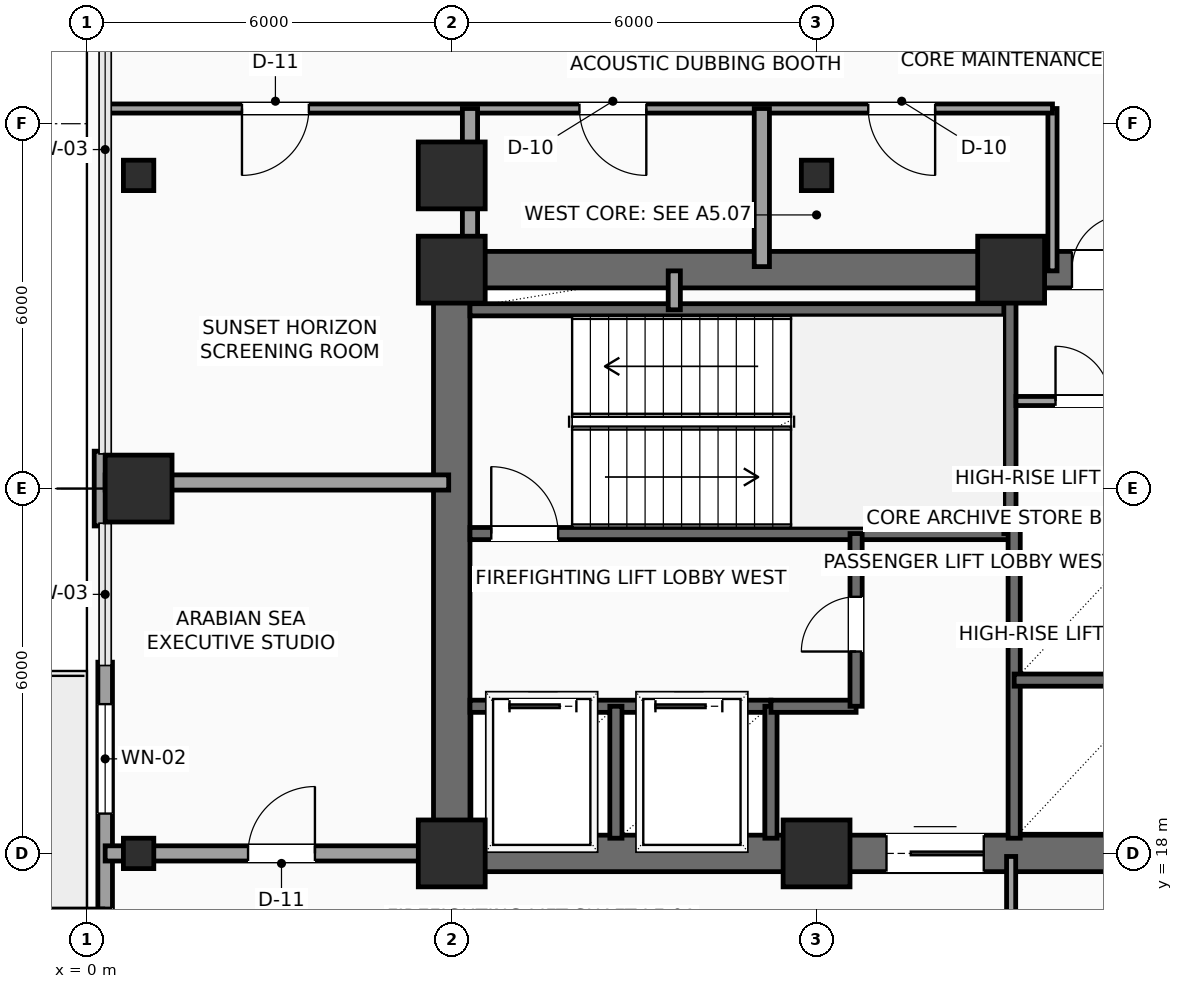
"""IFC4 building model, lengths in metres.
Left out: names, types, materials, properties, quantities, classifications, styles, units other than length and angle.
Written with IfcOpenShell. Run it as: python <this file> out.ifc"""

import sys

from ifc_helpers import new_model, si_unit, direction, frame, frame_2d, origin, origin_2d, place, context, subcontext, project, spatial, rectangle, hollow_rectangle, extrude, element, fill, save


model = new_model("IFC4")
c1 = context("Model", 3, precision=1e-05, world=origin(), true_north=direction((0.0, 1.0)))
c2 = subcontext(c1, "Body", "Model", "MODEL_VIEW")
j1 = project(units=[si_unit("LENGTHUNIT", "METRE"), si_unit("PLANEANGLEUNIT", "RADIAN")], contexts=[c1])
p1 = place(None, origin())
s1 = spatial("IfcSite", under=j1, at=p1, CompositionType="ELEMENT")
p2 = place(p1, origin())
s2 = spatial("IfcBuilding", under=s1, at=p2, CompositionType="ELEMENT")
p3 = place(p2, frame((0.0, 0.0, 130.65)))
s3 = spatial("IfcBuildingStorey", under=s2, at=p3, CompositionType="ELEMENT", Elevation=130.65)
for number, where, z_axis, x_axis in (
    (1, (6.0, 18.0, 0.0), (0.0, 0.0, 1.0), (1.0, 0.0, 0.0)),
    (2, (12.0, 18.0, 0.0), (0.0, 0.0, 1.0), (1.0, 0.0, 0.0)),
    (3, (6.0, 27.6, 0.0), (0.0, 0.0, 1.0), (1.0, 0.0, 0.0)),
    (4, (15.2, 27.6, 0.0), (0.0, 0.0, 1.0), (1.0, 0.0, 0.0)),
):
    element("IfcColumn", number, at=place(p3, frame(where, z_axis=z_axis, x_axis=x_axis)), inside=s3, PredefinedType="COLUMN", context=c2, shape_type="SweptSolid", body=[
        extrude(rectangle(XDim=1.1, YDim=1.1, at=origin_2d()), origin(), (0.0, 0.0, 1.0), 3.75),
    ])
p4 = place(p3, frame((0.85, 18.0, 0.0), z_axis=(0.0, 0.0, 1.0), x_axis=(1.0, 0.0, 0.0)))
e5 = element("IfcColumn", 5, at=p4, inside=s3, PredefinedType="COLUMN", context=c2, shape_type="SweptSolid", body=[
    extrude(hollow_rectangle(XDim=0.5, YDim=0.5, WallThickness=0.025, InnerFilletRadius=0.025, OuterFilletRadius=0.04, at=origin_2d()), origin(), (0.0, 0.0, 1.0), 3.75),
])
p5 = place(p3, frame((0.85, 24.0, 0.0), z_axis=(0.0, 0.0, 1.0), x_axis=(1.0, 0.0, 0.0)))
e6 = element("IfcColumn", 6, at=p5, inside=s3, PredefinedType="COLUMN", context=c2, shape_type="SweptSolid", body=[
    extrude(rectangle(XDim=1.1, YDim=1.1, at=origin_2d()), origin(), (0.0, 0.0, 1.0), 3.75),
])
p6 = place(p3, frame((0.85, 29.15, 0.0), z_axis=(0.0, 0.0, 1.0), x_axis=(1.0, 0.0, 0.0)))
e7 = element("IfcColumn", 7, at=p6, inside=s3, PredefinedType="COLUMN", context=c2, shape_type="SweptSolid", body=[
    extrude(hollow_rectangle(XDim=0.5, YDim=0.5, WallThickness=0.025, InnerFilletRadius=0.025, OuterFilletRadius=0.04, at=origin_2d()), origin(), (0.0, 0.0, 1.0), 3.75),
])
p7 = place(p3, frame((6.0, 29.15, 0.0), z_axis=(0.0, 0.0, 1.0), x_axis=(1.0, 0.0, 0.0)))
e8 = element("IfcColumn", 8, at=p7, inside=s3, PredefinedType="COLUMN", context=c2, shape_type="SweptSolid", body=[
    extrude(rectangle(XDim=1.1, YDim=1.1, at=origin_2d()), origin(), (0.0, 0.0, 1.0), 3.75),
])
p8 = place(p3, frame((12.0, 29.15, 0.0), z_axis=(0.0, 0.0, 1.0), x_axis=(1.0, 0.0, 0.0)))
e9 = element("IfcColumn", 9, at=p8, inside=s3, PredefinedType="COLUMN", context=c2, shape_type="SweptSolid", body=[
    extrude(hollow_rectangle(XDim=0.5, YDim=0.5, WallThickness=0.025, InnerFilletRadius=0.025, OuterFilletRadius=0.04, at=origin_2d()), origin(), (0.0, 0.0, 1.0), 3.75),
])
p9 = place(p3, frame((0.3, 11.855, 0.0), z_axis=(0.0, 0.0, 1.0), x_axis=(0.0, 1.0, 0.0)))
e10 = element("IfcWall", 10, at=p9, inside=s3, PredefinedType="SOLIDWALL", context=c2, shape_type="SweptSolid", body=[
    extrude(rectangle(XDim=9.29, YDim=0.24, at=frame_2d((4.645, 0.0))), origin(), (0.0, 0.0, 1.0), 3.525),
])
p10 = place(p9, frame((4.2, 0.0, 0.0)))
e11 = element("IfcOpeningElement", 11, at=p10, cuts=e10, PredefinedType="OPENING", context=c2, shape_type="SweptSolid", body=[
    extrude(rectangle(XDim=1.05, YDim=2.2, at=frame_2d((0.525, 1.1))), frame((0.0, 0.13, 0.0), z_axis=(0.0, -1.0, 0.0), x_axis=(1.0, 0.0, 0.0)), (0.0, 0.0, 1.0), 0.26),
])
p11 = place(p9, frame((6.8, 0.0, 0.85)))
e12 = element("IfcOpeningElement", 12, at=p11, cuts=e10, PredefinedType="OPENING", context=c2, shape_type="SweptSolid", body=[
    extrude(rectangle(XDim=1.8, YDim=2.1, at=frame_2d((0.9, 1.05))), frame((0.0, 0.13, 0.0), z_axis=(0.0, -1.0, 0.0), x_axis=(1.0, 0.0, 0.0)), (0.0, 0.0, 1.0), 0.26),
])
p12 = place(p3, frame((0.24, 23.385, 0.0), z_axis=(0.0, 0.0, 1.0), x_axis=(0.0, 1.0, 0.0)))
e13 = element("IfcWall", 13, at=p12, inside=s3, PredefinedType="SOLIDWALL", context=c2, shape_type="SweptSolid", body=[
    extrude(rectangle(XDim=1.23, YDim=0.24, at=frame_2d((0.615, 0.0))), origin(), (0.0, 0.0, 1.0), 3.525),
])
p13 = place(p3, frame((6.0, 18.0, 0.0), z_axis=(0.0, 0.0, 1.0), x_axis=(1.0, 0.0, 0.0)))
e14 = element("IfcWall", 14, at=p13, inside=s3, PredefinedType="SHEAR", context=c2, shape_type="SweptSolid", body=[
    extrude(rectangle(XDim=12.0, YDim=0.6, at=frame_2d((6.0, 0.0))), origin(), (0.0, 0.0, 1.0), 3.525),
])
p14 = place(p13, frame((7.15, 0.0, 0.0)))
e15 = element("IfcOpeningElement", 15, at=p14, cuts=e14, PredefinedType="OPENING", context=c2, shape_type="SweptSolid", body=[
    extrude(rectangle(XDim=1.6, YDim=2.3, at=frame_2d((0.8, 1.15))), frame((0.0, 0.31, 0.0), z_axis=(0.0, -1.0, 0.0), x_axis=(1.0, 0.0, 0.0)), (0.0, 0.0, 1.0), 0.62),
])
p15 = place(p3, frame((6.0, 27.6, 0.0), z_axis=(0.0, 0.0, 1.0), x_axis=(1.0, 0.0, 0.0)))
e16 = element("IfcWall", 16, at=p15, inside=s3, PredefinedType="SHEAR", context=c2, shape_type="SweptSolid", body=[
    extrude(rectangle(XDim=12.0, YDim=0.6, at=frame_2d((6.0, 0.0))), origin(), (0.0, 0.0, 1.0), 3.525),
])
p16 = place(p15, frame((10.2, 0.0, 0.0)))
e17 = element("IfcOpeningElement", 17, at=p16, cuts=e16, PredefinedType="OPENING", context=c2, shape_type="SweptSolid", body=[
    extrude(rectangle(XDim=0.9, YDim=2.15, at=frame_2d((0.45, 1.075))), frame((0.0, 0.31, 0.0), z_axis=(0.0, -1.0, 0.0), x_axis=(1.0, 0.0, 0.0)), (0.0, 0.0, 1.0), 0.62),
])
p17 = place(p3, frame((6.0, 18.0, 0.0), z_axis=(0.0, 0.0, 1.0), x_axis=(0.0, 1.0, 0.0)))
e18 = element("IfcWall", 18, at=p17, inside=s3, PredefinedType="SHEAR", context=c2, shape_type="SweptSolid", body=[
    extrude(rectangle(XDim=9.6, YDim=0.6, at=frame_2d((4.8, 0.0))), origin(), (0.0, 0.0, 1.0), 3.525),
])
p18 = place(p3, frame((6.3, 23.26, 0.0), z_axis=(0.0, 0.0, 1.0), x_axis=(1.0, 0.0, 0.0)))
e19 = element("IfcWall", 19, at=p18, inside=s3, PredefinedType="SHEAR", context=c2, shape_type="SweptSolid", body=[
    extrude(rectangle(XDim=8.88, YDim=0.2, at=frame_2d((4.44, 0.0))), origin(), (0.0, 0.0, 1.0), 3.525),
])
p19 = place(p18, frame((0.35, 0.0, 0.0)))
e20 = element("IfcOpeningElement", 20, at=p19, cuts=e19, PredefinedType="OPENING", context=c2, shape_type="SweptSolid", body=[
    extrude(rectangle(XDim=1.1, YDim=2.2, at=frame_2d((0.55, 1.1))), frame((0.0, 0.11, 0.0), z_axis=(0.0, -1.0, 0.0), x_axis=(1.0, 0.0, 0.0)), (0.0, 0.0, 1.0), 0.22),
])
p20 = place(p3, frame((6.3, 26.94, 0.0), z_axis=(0.0, 0.0, 1.0), x_axis=(1.0, 0.0, 0.0)))
e21 = element("IfcWall", 21, at=p20, inside=s3, PredefinedType="SHEAR", context=c2, shape_type="SweptSolid", body=[
    extrude(rectangle(XDim=8.88, YDim=0.2, at=frame_2d((4.44, 0.0))), origin(), (0.0, 0.0, 1.0), 3.525),
])
p21 = place(p3, frame((15.18, 23.26, 0.0), z_axis=(0.0, 0.0, 1.0), x_axis=(0.0, 1.0, 0.0)))
e22 = element("IfcWall", 22, at=p21, inside=s3, PredefinedType="SHEAR", context=c2, shape_type="SweptSolid", body=[
    extrude(rectangle(XDim=4.04, YDim=0.2, at=frame_2d((2.02, 0.0))), origin(), (0.0, 0.0, 1.0), 3.525),
])
p22 = place(p3, frame((6.3, 20.42, 0.0), z_axis=(0.0, 0.0, 1.0), x_axis=(1.0, 0.0, 0.0)))
e23 = element("IfcWall", 23, at=p22, inside=s3, PredefinedType="SHEAR", context=c2, shape_type="SweptSolid", body=[
    extrude(rectangle(XDim=4.95, YDim=0.2, at=frame_2d((2.475, 0.0))), origin(), (0.0, 0.0, 1.0), 3.525),
])
p23 = place(p22, frame((0.65, 0.0, 0.0)))
e24 = element("IfcOpeningElement", 24, at=p23, cuts=e23, PredefinedType="OPENING", context=c2, shape_type="SweptSolid", body=[
    extrude(rectangle(XDim=1.1, YDim=2.2, at=frame_2d((0.55, 1.1))), frame((0.0, 0.11, 0.0), z_axis=(0.0, -1.0, 0.0), x_axis=(1.0, 0.0, 0.0)), (0.0, 0.0, 1.0), 0.22),
])
p24 = place(p22, frame((3.05, 0.0, 0.0)))
e25 = element("IfcOpeningElement", 25, at=p24, cuts=e23, PredefinedType="OPENING", context=c2, shape_type="SweptSolid", body=[
    extrude(rectangle(XDim=1.1, YDim=2.2, at=frame_2d((0.55, 1.1))), frame((0.0, 0.11, 0.0), z_axis=(0.0, -1.0, 0.0), x_axis=(1.0, 0.0, 0.0)), (0.0, 0.0, 1.0), 0.22),
])
for number, where, z_axis, x_axis in (
    (26, (8.7, 18.25, 0.0), (0.0, 0.0, 1.0), (0.0, 1.0, 0.0)),
    (27, (11.25, 18.25, 0.0), (0.0, 0.0, 1.0), (0.0, 1.0, 0.0)),
):
    element("IfcWall", number, at=place(p3, frame(where, z_axis=z_axis, x_axis=x_axis)), inside=s3, PredefinedType="SHEAR", context=c2, shape_type="SweptSolid", body=[
        extrude(rectangle(XDim=2.17, YDim=0.2, at=frame_2d((1.085, 0.0))), origin(), (0.0, 0.0, 1.0), 3.525),
    ])
p25 = place(p3, frame((11.25, 20.42, 0.0), z_axis=(0.0, 0.0, 1.0), x_axis=(1.0, 0.0, 0.0)))
e28 = element("IfcWall", 28, at=p25, inside=s3, PredefinedType="SHEAR", context=c2, shape_type="SweptSolid", body=[
    extrude(rectangle(XDim=1.4, YDim=0.2, at=frame_2d((0.7, 0.0))), origin(), (0.0, 0.0, 1.0), 3.525),
])
p26 = place(p3, frame((12.65, 20.42, 0.0), z_axis=(0.0, 0.0, 1.0), x_axis=(0.0, 1.0, 0.0)))
e29 = element("IfcWall", 29, at=p26, inside=s3, PredefinedType="SHEAR", context=c2, shape_type="SweptSolid", body=[
    extrude(rectangle(XDim=2.84, YDim=0.2, at=frame_2d((1.42, 0.0))), origin(), (0.0, 0.0, 1.0), 3.525),
])
p27 = place(p26, frame((0.9, 0.0, 0.0)))
e30 = element("IfcOpeningElement", 30, at=p27, cuts=e29, PredefinedType="OPENING", context=c2, shape_type="SweptSolid", body=[
    extrude(rectangle(XDim=0.9, YDim=2.15, at=frame_2d((0.45, 1.075))), frame((0.0, 0.11, 0.0), z_axis=(0.0, -1.0, 0.0), x_axis=(1.0, 0.0, 0.0)), (0.0, 0.0, 1.0), 0.22),
])
p28 = place(p3, frame((9.66, 26.94, 0.0), z_axis=(0.0, 0.0, 1.0), x_axis=(0.0, 1.0, 0.0)))
e31 = element("IfcWall", 31, at=p28, inside=s3, PredefinedType="SOLIDWALL", context=c2, shape_type="SweptSolid", body=[
    extrude(rectangle(XDim=0.64, YDim=0.2, at=frame_2d((0.32, 0.0))), origin(), (0.0, 0.0, 1.0), 3.525),
])
p29 = place(p3, frame((15.25, 18.25, 0.0), z_axis=(0.0, 0.0, 1.0), x_axis=(0.0, 1.0, 0.0)))
e32 = element("IfcWall", 32, at=p29, inside=s3, PredefinedType="SHEAR", context=c2, shape_type="SweptSolid", body=[
    extrude(rectangle(XDim=5.2, YDim=0.2, at=frame_2d((2.6, 0.0))), origin(), (0.0, 0.0, 1.0), 3.525),
])
p30 = place(p3, frame((15.25, 20.85, 0.0), z_axis=(0.0, 0.0, 1.0), x_axis=(1.0, 0.0, 0.0)))
e33 = element("IfcWall", 33, at=p30, inside=s3, PredefinedType="SHEAR", context=c2, shape_type="SweptSolid", body=[
    extrude(rectangle(XDim=2.4, YDim=0.2, at=frame_2d((1.2, 0.0))), origin(), (0.0, 0.0, 1.0), 3.525),
])
p31 = place(p3, frame((15.25, 23.45, 0.0), z_axis=(0.0, 0.0, 1.0), x_axis=(1.0, 0.0, 0.0)))
e34 = element("IfcWall", 34, at=p31, inside=s3, PredefinedType="SHEAR", context=c2, shape_type="SweptSolid", body=[
    extrude(rectangle(XDim=2.45, YDim=0.2, at=frame_2d((1.225, 0.0))), origin(), (0.0, 0.0, 1.0), 3.525),
])
p32 = place(p3, frame((15.28, 25.44, 0.0), z_axis=(0.0, 0.0, 1.0), x_axis=(1.0, 0.0, 0.0)))
e35 = element("IfcWall", 35, at=p32, inside=s3, PredefinedType="PARTITIONING", context=c2, shape_type="SweptSolid", body=[
    extrude(rectangle(XDim=2.42, YDim=0.15, at=frame_2d((1.21, 0.0))), origin(), (0.0, 0.0, 1.0), 3.525),
])
p33 = place(p32, frame((0.65, 0.0, 0.0)))
e36 = element("IfcOpeningElement", 36, at=p33, cuts=e35, PredefinedType="OPENING", context=c2, shape_type="SweptSolid", body=[
    extrude(rectangle(XDim=0.9, YDim=2.15, at=frame_2d((0.45, 1.075))), frame((0.0, 0.085, 0.0), z_axis=(0.0, -1.0, 0.0), x_axis=(1.0, 0.0, 0.0)), (0.0, 0.0, 1.0), 0.17),
])
p34 = place(p3, frame((15.2, 17.95, 0.0), z_axis=(0.0, 0.0, 1.0), x_axis=(0.0, -1.0, 0.0)))
e37 = element("IfcWall", 37, at=p34, inside=s3, PredefinedType="PARTITIONING", context=c2, shape_type="SweptSolid", body=[
    extrude(rectangle(XDim=2.4, YDim=0.15, at=frame_2d((1.2, 0.0))), origin(), (0.0, 0.0, 1.0), 3.525),
])
p35 = place(p3, frame((15.88, 27.58, 0.0), z_axis=(0.0, 0.0, 1.0), x_axis=(0.0, 1.0, 0.0)))
e38 = element("IfcWall", 38, at=p35, inside=s3, PredefinedType="PARTITIONING", context=c2, shape_type="SweptSolid", body=[
    extrude(rectangle(XDim=2.67, YDim=0.15, at=frame_2d((1.335, 0.0))), origin(), (0.0, 0.0, 1.0), 3.525),
])
p36 = place(p3, frame((15.88, 30.25, 0.0), z_axis=(0.0, 0.0, 1.0), x_axis=(-1.0, 0.0, 0.0)))
e39 = element("IfcWall", 39, at=p36, inside=s3, PredefinedType="PARTITIONING", context=c2, shape_type="SweptSolid", body=[
    extrude(rectangle(XDim=15.58, YDim=0.15, at=frame_2d((7.79, 0.0))), origin(), (0.0, 0.0, 1.0), 3.525),
])
p37 = place(p36, frame((12.23, 0.0, 0.0)))
e40 = element("IfcOpeningElement", 40, at=p37, cuts=e39, PredefinedType="OPENING", context=c2, shape_type="SweptSolid", body=[
    extrude(rectangle(XDim=1.1, YDim=2.25, at=frame_2d((0.55, 1.125))), frame((0.0, 0.085, 0.0), z_axis=(0.0, -1.0, 0.0), x_axis=(1.0, 0.0, 0.0)), (0.0, 0.0, 1.0), 0.17),
])
p38 = place(p36, frame((6.68, 0.0, 0.0)))
e41 = element("IfcOpeningElement", 41, at=p38, cuts=e39, PredefinedType="OPENING", context=c2, shape_type="SweptSolid", body=[
    extrude(rectangle(XDim=1.1, YDim=2.25, at=frame_2d((0.55, 1.125))), frame((0.0, 0.085, 0.0), z_axis=(0.0, -1.0, 0.0), x_axis=(1.0, 0.0, 0.0)), (0.0, 0.0, 1.0), 0.17),
])
p39 = place(p36, frame((1.93, 0.0, 0.0)))
e42 = element("IfcOpeningElement", 42, at=p39, cuts=e39, PredefinedType="OPENING", context=c2, shape_type="SweptSolid", body=[
    extrude(rectangle(XDim=1.1, YDim=2.25, at=frame_2d((0.55, 1.125))), frame((0.0, 0.085, 0.0), z_axis=(0.0, -1.0, 0.0), x_axis=(1.0, 0.0, 0.0)), (0.0, 0.0, 1.0), 0.17),
])
p40 = place(p3, frame((0.3, 18.0, 0.0), z_axis=(0.0, 0.0, 1.0), x_axis=(1.0, 0.0, 0.0)))
e43 = element("IfcWall", 43, at=p40, inside=s3, PredefinedType="PARTITIONING", context=c2, shape_type="SweptSolid", body=[
    extrude(rectangle(XDim=5.65, YDim=0.25, at=frame_2d((2.825, 0.0))), origin(), (0.0, 0.0, 1.0), 3.017),
])
p41 = place(p40, frame((2.35, 0.0, 0.0)))
e44 = element("IfcOpeningElement", 44, at=p41, cuts=e43, PredefinedType="OPENING", context=c2, shape_type="SweptSolid", body=[
    extrude(rectangle(XDim=1.1, YDim=2.25, at=frame_2d((0.55, 1.125))), frame((0.0, 0.135, 0.0), z_axis=(0.0, -1.0, 0.0), x_axis=(1.0, 0.0, 0.0)), (0.0, 0.0, 1.0), 0.27),
])
p42 = place(p3, frame((0.3, 24.1, 0.0), z_axis=(0.0, 0.0, 1.0), x_axis=(1.0, 0.0, 0.0)))
e45 = element("IfcWall", 45, at=p42, inside=s3, PredefinedType="PARTITIONING", context=c2, shape_type="SweptSolid", body=[
    extrude(rectangle(XDim=5.65, YDim=0.25, at=frame_2d((2.825, 0.0))), origin(), (0.0, 0.0, 1.0), 3.525),
])
p43 = place(p3, frame((6.3, 27.65, 0.0), z_axis=(0.0, 0.0, 1.0), x_axis=(0.0, 1.0, 0.0)))
e46 = element("IfcWall", 46, at=p43, inside=s3, PredefinedType="PARTITIONING", context=c2, shape_type="SweptSolid", body=[
    extrude(rectangle(XDim=2.6, YDim=0.25, at=frame_2d((1.3, 0.0))), origin(), (0.0, 0.0, 1.0), 3.017),
])
p44 = place(p3, frame((11.1, 27.65, 0.0), z_axis=(0.0, 0.0, 1.0), x_axis=(0.0, 1.0, 0.0)))
e47 = element("IfcWall", 47, at=p44, inside=s3, PredefinedType="PARTITIONING", context=c2, shape_type="SweptSolid", body=[
    extrude(rectangle(XDim=2.6, YDim=0.25, at=frame_2d((1.3, 0.0))), origin(), (0.0, 0.0, 1.0), 3.525),
])
p45 = place(p10, origin())
e48 = element("IfcDoor", 48, at=p45, inside=s3, OperationType="SINGLE_SWING_RIGHT", PredefinedType="DOOR", context=c2, shape_type="SweptSolid", body=[
    extrude(rectangle(XDim=1.05, YDim=2.2, at=frame_2d((0.525, 1.1))), frame((0.0, 0.025, 0.0), z_axis=(0.0, -1.0, 0.0), x_axis=(1.0, 0.0, 0.0)), (0.0, 0.0, 1.0), 0.05),
])
fill(e11, e48)
p46 = place(p11, origin())
e49 = element("IfcWindow", 49, at=p46, inside=s3, PartitioningType="SINGLE_PANEL", PredefinedType="WINDOW", context=c2, shape_type="SweptSolid", body=[
    extrude(rectangle(XDim=1.8, YDim=2.1, at=frame_2d((0.9, 1.05))), frame((0.0, 0.03, 0.0), z_axis=(0.0, -1.0, 0.0), x_axis=(1.0, 0.0, 0.0)), (0.0, 0.0, 1.0), 0.06),
])
fill(e12, e49)
p47 = place(p14, origin())
e50 = element("IfcDoor", 50, at=p47, inside=s3, OperationType="DOUBLE_DOOR_SLIDING", PredefinedType="DOOR", context=c2, shape_type="SweptSolid", body=[
    extrude(rectangle(XDim=1.6, YDim=2.3, at=frame_2d((0.8, 1.15))), frame((0.0, 0.025, 0.0), z_axis=(0.0, -1.0, 0.0), x_axis=(1.0, 0.0, 0.0)), (0.0, 0.0, 1.0), 0.05),
])
fill(e15, e50)
p48 = place(p16, origin())
e51 = element("IfcDoor", 51, at=p48, inside=s3, OperationType="SINGLE_SWING_RIGHT", PredefinedType="DOOR", context=c2, shape_type="SweptSolid", body=[
    extrude(rectangle(XDim=0.9, YDim=2.15, at=frame_2d((0.45, 1.075))), frame((0.0, 0.025, 0.0), z_axis=(0.0, -1.0, 0.0), x_axis=(1.0, 0.0, 0.0)), (0.0, 0.0, 1.0), 0.05),
])
fill(e17, e51)
p49 = place(p19, origin())
e52 = element("IfcDoor", 52, at=p49, inside=s3, OperationType="SINGLE_SWING_LEFT", PredefinedType="DOOR", context=c2, shape_type="SweptSolid", body=[
    extrude(rectangle(XDim=1.1, YDim=2.2, at=frame_2d((0.55, 1.1))), frame((0.0, 0.025, 0.0), z_axis=(0.0, -1.0, 0.0), x_axis=(1.0, 0.0, 0.0)), (0.0, 0.0, 1.0), 0.05),
])
fill(e20, e52)
p50 = place(p23, origin())
e53 = element("IfcDoor", 53, at=p50, inside=s3, OperationType="SLIDING_TO_LEFT", PredefinedType="DOOR", context=c2, shape_type="SweptSolid", body=[
    extrude(rectangle(XDim=1.1, YDim=2.2, at=frame_2d((0.55, 1.1))), frame((0.0, 0.025, 0.0), z_axis=(0.0, -1.0, 0.0), x_axis=(1.0, 0.0, 0.0)), (0.0, 0.0, 1.0), 0.05),
])
fill(e24, e53)
p51 = place(p24, origin())
e54 = element("IfcDoor", 54, at=p51, inside=s3, OperationType="SLIDING_TO_LEFT", PredefinedType="DOOR", context=c2, shape_type="SweptSolid", body=[
    extrude(rectangle(XDim=1.1, YDim=2.2, at=frame_2d((0.55, 1.1))), frame((0.0, 0.025, 0.0), z_axis=(0.0, -1.0, 0.0), x_axis=(1.0, 0.0, 0.0)), (0.0, 0.0, 1.0), 0.05),
])
fill(e25, e54)
p52 = place(p27, origin())
e55 = element("IfcDoor", 55, at=p52, inside=s3, OperationType="SINGLE_SWING_LEFT", PredefinedType="DOOR", context=c2, shape_type="SweptSolid", body=[
    extrude(rectangle(XDim=0.9, YDim=2.15, at=frame_2d((0.45, 1.075))), frame((0.0, 0.025, 0.0), z_axis=(0.0, -1.0, 0.0), x_axis=(1.0, 0.0, 0.0)), (0.0, 0.0, 1.0), 0.05),
])
fill(e30, e55)
p53 = place(p33, origin())
e56 = element("IfcDoor", 56, at=p53, inside=s3, OperationType="SINGLE_SWING_LEFT", PredefinedType="DOOR", context=c2, shape_type="SweptSolid", body=[
    extrude(rectangle(XDim=0.9, YDim=2.15, at=frame_2d((0.45, 1.075))), frame((0.0, 0.025, 0.0), z_axis=(0.0, -1.0, 0.0), x_axis=(1.0, 0.0, 0.0)), (0.0, 0.0, 1.0), 0.05),
])
fill(e36, e56)
p54 = place(p37, origin())
e57 = element("IfcDoor", 57, at=p54, inside=s3, OperationType="SINGLE_SWING_RIGHT", PredefinedType="DOOR", context=c2, shape_type="SweptSolid", body=[
    extrude(rectangle(XDim=1.1, YDim=2.25, at=frame_2d((0.55, 1.125))), frame((0.0, 0.025, 0.0), z_axis=(0.0, -1.0, 0.0), x_axis=(1.0, 0.0, 0.0)), (0.0, 0.0, 1.0), 0.05),
])
fill(e40, e57)
p55 = place(p38, origin())
e58 = element("IfcDoor", 58, at=p55, inside=s3, OperationType="SINGLE_SWING_LEFT", PredefinedType="DOOR", context=c2, shape_type="SweptSolid", body=[
    extrude(rectangle(XDim=1.1, YDim=2.25, at=frame_2d((0.55, 1.125))), frame((0.0, 0.025, 0.0), z_axis=(0.0, -1.0, 0.0), x_axis=(1.0, 0.0, 0.0)), (0.0, 0.0, 1.0), 0.05),
])
fill(e41, e58)
p56 = place(p39, origin())
e59 = element("IfcDoor", 59, at=p56, inside=s3, OperationType="SINGLE_SWING_LEFT", PredefinedType="DOOR", context=c2, shape_type="SweptSolid", body=[
    extrude(rectangle(XDim=1.1, YDim=2.25, at=frame_2d((0.55, 1.125))), frame((0.0, 0.025, 0.0), z_axis=(0.0, -1.0, 0.0), x_axis=(1.0, 0.0, 0.0)), (0.0, 0.0, 1.0), 0.05),
])
fill(e42, e59)
p57 = place(p41, origin())
e60 = element("IfcDoor", 60, at=p57, inside=s3, OperationType="SINGLE_SWING_RIGHT", PredefinedType="DOOR", context=c2, shape_type="SweptSolid", body=[
    extrude(rectangle(XDim=1.1, YDim=2.25, at=frame_2d((0.55, 1.125))), frame((0.0, 0.025, 0.0), z_axis=(0.0, -1.0, 0.0), x_axis=(1.0, 0.0, 0.0)), (0.0, 0.0, 1.0), 0.05),
])
fill(e44, e60)
save(model, sys.argv[1])
